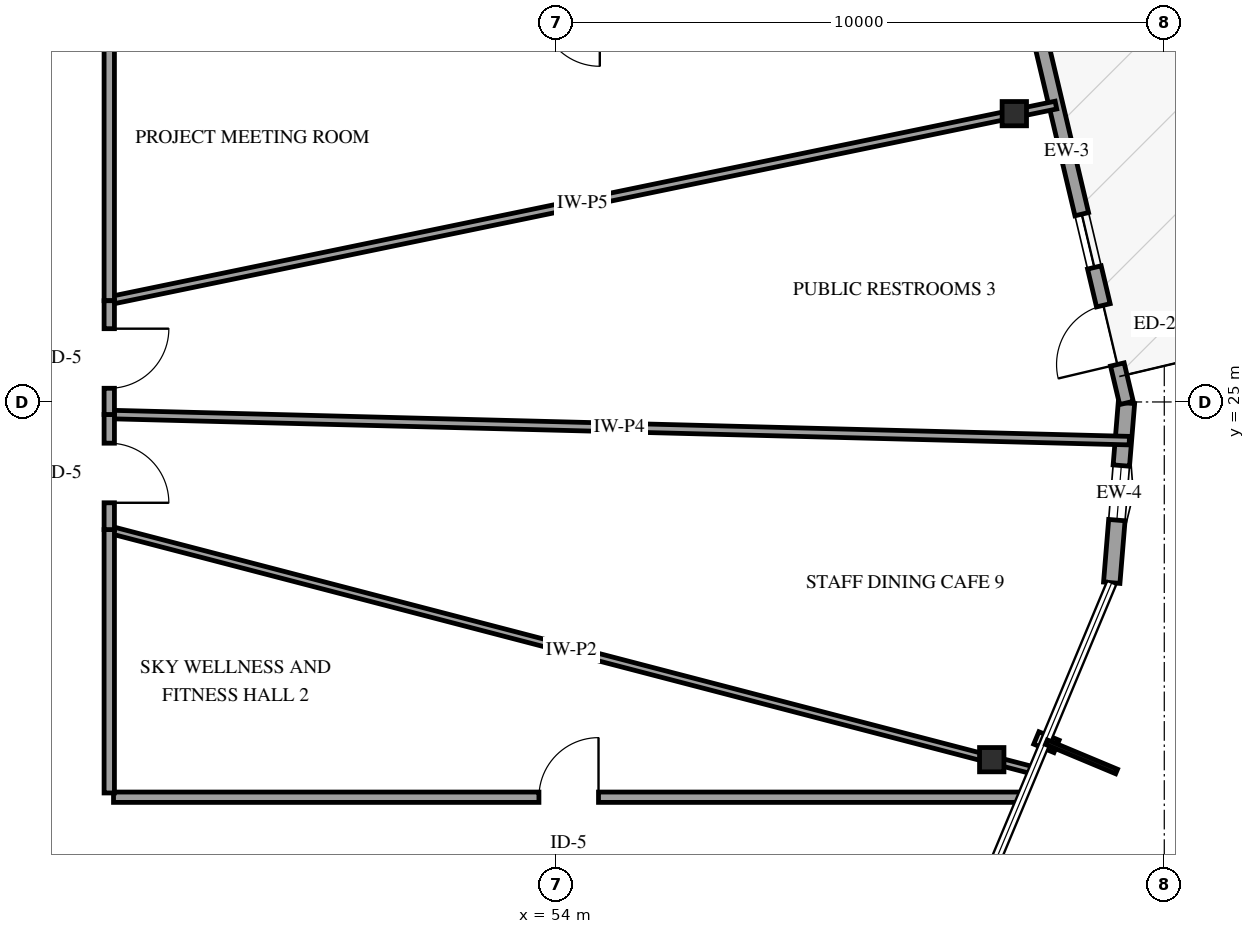
"""IFC4 building model, lengths in metres.
Left out: names, types, materials, properties, quantities, classifications, styles, units other than length and angle.
Written with IfcOpenShell. Run it as: python <this file> out.ifc"""

import sys

from ifc_helpers import new_model, si_unit, direction, frame, frame_2d, origin, origin_2d, place, context, subcontext, project, spatial, rectangle, i_section, extrude, element, fill, save


model = new_model("IFC4")
c1 = context("Model", 3, precision=1e-05, world=origin(), true_north=direction((0.0, 1.0)))
c2 = subcontext(c1, "Body", "Model", "MODEL_VIEW")
j1 = project(units=[si_unit("LENGTHUNIT", "METRE"), si_unit("PLANEANGLEUNIT", "RADIAN")], contexts=[c1])
p1 = place(None, origin())
s1 = spatial("IfcSite", under=j1, at=p1, CompositionType="ELEMENT")
p2 = place(p1, origin())
s2 = spatial("IfcBuilding", under=s1, at=p2, CompositionType="ELEMENT")
p3 = place(p2, frame((0.0, 0.0, 280.0)))
s3 = spatial("IfcBuildingStorey", under=s2, at=p3, CompositionType="ELEMENT", Elevation=280.0)
for number, where, z_axis, x_axis in (
    (1, (61.534, 29.741, 0.0), (0.0, 0.0, 1.0), (1.0, 0.0, 0.0)),
    (2, (61.163, 19.117, 0.0), (0.0, 0.0, 1.0), (1.0, 0.0, 0.0)),
):
    element("IfcColumn", number, at=place(p3, frame(where, z_axis=z_axis, x_axis=x_axis)), inside=s3, PredefinedType="COLUMN", context=c2, shape_type="SweptSolid", body=[
        extrude(i_section(OverallWidth=0.401, OverallDepth=0.399, WebThickness=0.025, FlangeThickness=0.04, FilletRadius=0.038, at=origin_2d()), origin(), (0.0, 0.0, 1.0), 3.75),
    ])
p4 = place(p3, frame((63.136, 22.027, 0.0), z_axis=(0.0, 0.0, 1.0), x_axis=(0.081553869603, 0.99666893518, 0.0)))
e3 = element("IfcWall", 3, at=p4, inside=s3, PredefinedType="SOLIDWALL", context=c2, shape_type="SweptSolid", body=[
    extrude(rectangle(XDim=2.967, YDim=0.27, at=frame_2d((1.483, 0.0))), origin(), (0.0, 0.0, 1.0), 2.789),
])
p5 = place(p4, frame((1.033, 0.0, 0.75)))
e4 = element("IfcOpeningElement", 4, at=p5, cuts=e3, PredefinedType="OPENING", context=c2, shape_type="SweptSolid", body=[
    extrude(rectangle(XDim=0.9, YDim=1.5, at=frame_2d((0.45, 0.75))), frame((0.0, 0.145, 0.0), z_axis=(0.0, -1.0, 0.0), x_axis=(1.0, 0.0, 0.0)), (0.0, 0.0, 1.0), 0.29),
])
p6 = place(p3, frame((63.378, 24.984, 0.0), z_axis=(0.0, 0.0, 1.0), x_axis=(-0.230391946718, 0.973097914337, 0.0)))
e5 = element("IfcWall", 5, at=p6, inside=s3, PredefinedType="SOLIDWALL", context=c2, shape_type="SweptSolid", body=[
    extrude(rectangle(XDim=8.5, YDim=0.23, at=frame_2d((4.25, 0.0))), origin(), (0.0, 0.0, 1.0), 2.789),
])
p7 = place(p6, frame((0.65, 0.0, 0.0)))
e6 = element("IfcOpeningElement", 6, at=p7, cuts=e5, PredefinedType="OPENING", context=c2, shape_type="SweptSolid", body=[
    extrude(rectangle(XDim=1.0, YDim=2.15, at=frame_2d((0.5, 1.075))), frame((0.0, 0.125, 0.0), z_axis=(0.0, -1.0, 0.0), x_axis=(1.0, 0.0, 0.0)), (0.0, 0.0, 1.0), 0.25),
])
p8 = place(p6, frame((2.29, 0.0, 0.72)))
e7 = element("IfcOpeningElement", 7, at=p8, cuts=e5, PredefinedType="OPENING", context=c2, shape_type="SweptSolid", body=[
    extrude(rectangle(XDim=0.9, YDim=1.5, at=frame_2d((0.45, 0.75))), frame((0.0, 0.125, 0.0), z_axis=(0.0, -1.0, 0.0), x_axis=(1.0, 0.0, 0.0)), (0.0, 0.0, 1.0), 0.25),
])
p9 = place(p3, frame((63.425, 24.364, 0.0), z_axis=(0.0, 0.0, 1.0), x_axis=(-0.999671736729, 0.025620671048, 0.0)))
e8 = element("IfcWall", 8, at=p9, inside=s3, PredefinedType="PARTITIONING", context=c2, shape_type="SweptSolid", body=[
    extrude(rectangle(XDim=16.781, YDim=0.14, at=frame_2d((8.39, 0.0))), origin(), (0.0, 0.0, 1.0), 3.41),
])
p10 = place(p3, frame((46.65, 26.665, 0.0), z_axis=(0.0, 0.0, 1.0), x_axis=(0.97930966803, 0.202367423521, 0.0)))
e9 = element("IfcWall", 9, at=p10, inside=s3, PredefinedType="PARTITIONING", context=c2, shape_type="SweptSolid", body=[
    extrude(rectangle(XDim=15.897, YDim=0.13, at=frame_2d((7.948, 0.0))), origin(), (0.0, 0.0, 1.0), 2.705),
])
p11 = place(p3, frame((46.65, 22.901, 0.0), z_axis=(0.0, 0.0, 1.0), x_axis=(0.967667772628, -0.252228233586, 0.0)))
e10 = element("IfcWall", 10, at=p11, inside=s3, PredefinedType="PARTITIONING", context=c2, shape_type="SweptSolid", body=[
    extrude(rectangle(XDim=15.704, YDim=0.12, at=frame_2d((7.852, 0.0))), origin(), (0.0, 0.0, 1.0), 3.41),
])
p12 = place(p3, frame((46.72, 18.5, 0.0), z_axis=(0.0, 0.0, 1.0), x_axis=(1.0, 0.0, 0.0)))
e11 = element("IfcWall", 11, at=p12, inside=s3, PredefinedType="PARTITIONING", context=c2, shape_type="SweptSolid", body=[
    extrude(rectangle(XDim=14.942, YDim=0.17, at=frame_2d((7.471, 0.0))), origin(), (0.0, 0.0, 1.0), 2.705),
])
p13 = place(p12, frame((6.996, 0.0, 0.0)))
e12 = element("IfcOpeningElement", 12, at=p13, cuts=e11, PredefinedType="OPENING", context=c2, shape_type="SweptSolid", body=[
    extrude(rectangle(XDim=0.98, YDim=2.15, at=frame_2d((0.49, 1.075))), frame((0.0, 0.095, 0.0), z_axis=(0.0, -1.0, 0.0), x_axis=(1.0, 0.0, 0.0)), (0.0, 0.0, 1.0), 0.19),
])
p14 = place(p3, frame((46.65, 31.5, 0.0), z_axis=(0.0, 0.0, 1.0), x_axis=(0.0, -1.0, 0.0)))
e13 = element("IfcWall", 13, at=p14, inside=s3, PredefinedType="PARTITIONING", context=c2, shape_type="SweptSolid", body=[
    extrude(rectangle(XDim=4.835, YDim=0.17, at=frame_2d((2.417, 0.0))), origin(), (0.0, 0.0, 1.0), 3.41),
])
p15 = place(p3, frame((46.65, 22.901, 0.0), z_axis=(0.0, 0.0, 1.0), x_axis=(0.0, -1.0, 0.0)))
e14 = element("IfcWall", 14, at=p15, inside=s3, PredefinedType="PARTITIONING", context=c2, shape_type="SweptSolid", body=[
    extrude(rectangle(XDim=4.331, YDim=0.17, at=frame_2d((2.166, 0.0))), origin(), (0.0, 0.0, 1.0), 3.41),
])
p16 = place(p3, frame((46.65, 24.794, 0.0), z_axis=(0.0, 0.0, 1.0), x_axis=(0.0, -1.0, 0.0)))
e15 = element("IfcWall", 15, at=p16, inside=s3, PredefinedType="PARTITIONING", context=c2, shape_type="SweptSolid", body=[
    extrude(rectangle(XDim=1.893, YDim=0.17, at=frame_2d((0.947, 0.0))), origin(), (0.0, 0.0, 1.0), 3.41),
])
p17 = place(p16, frame((0.472, 0.0, 0.0)))
e16 = element("IfcOpeningElement", 16, at=p17, cuts=e15, PredefinedType="OPENING", context=c2, shape_type="SweptSolid", body=[
    extrude(rectangle(XDim=0.98, YDim=2.15, at=frame_2d((0.49, 1.075))), frame((0.0, 0.095, 0.0), z_axis=(0.0, -1.0, 0.0), x_axis=(1.0, 0.0, 0.0)), (0.0, 0.0, 1.0), 0.19),
])
p18 = place(p3, frame((46.65, 26.665, 0.0), z_axis=(0.0, 0.0, 1.0), x_axis=(0.0, -1.0, 0.0)))
e17 = element("IfcWall", 17, at=p18, inside=s3, PredefinedType="PARTITIONING", context=c2, shape_type="SweptSolid", body=[
    extrude(rectangle(XDim=1.871, YDim=0.17, at=frame_2d((0.936, 0.0))), origin(), (0.0, 0.0, 1.0), 3.41),
])
p19 = place(p18, frame((0.46, 0.0, 0.0)))
e18 = element("IfcOpeningElement", 18, at=p19, cuts=e17, PredefinedType="OPENING", context=c2, shape_type="SweptSolid", body=[
    extrude(rectangle(XDim=0.98, YDim=2.15, at=frame_2d((0.49, 1.075))), frame((0.0, 0.095, 0.0), z_axis=(0.0, -1.0, 0.0), x_axis=(1.0, 0.0, 0.0)), (0.0, 0.0, 1.0), 0.19),
])
p20 = place(p5, origin())
e19 = element("IfcWindow", 19, at=p20, inside=s3, PartitioningType="SINGLE_PANEL", PredefinedType="WINDOW", context=c2, shape_type="SweptSolid", body=[
    extrude(rectangle(XDim=0.9, YDim=1.5, at=frame_2d((0.45, 0.75))), frame((0.0, 0.03, 0.0), z_axis=(0.0, -1.0, 0.0), x_axis=(1.0, 0.0, 0.0)), (0.0, 0.0, 1.0), 0.06),
])
fill(e4, e19)
p21 = place(p7, origin())
e20 = element("IfcDoor", 20, at=p21, inside=s3, OperationType="SINGLE_SWING_LEFT", PredefinedType="DOOR", context=c2, shape_type="SweptSolid", body=[
    extrude(rectangle(XDim=1.0, YDim=2.15, at=frame_2d((0.5, 1.075))), frame((0.0, 0.025, 0.0), z_axis=(0.0, -1.0, 0.0), x_axis=(1.0, 0.0, 0.0)), (0.0, 0.0, 1.0), 0.05),
])
fill(e6, e20)
p22 = place(p8, origin())
e21 = element("IfcWindow", 21, at=p22, inside=s3, PartitioningType="SINGLE_PANEL", PredefinedType="WINDOW", context=c2, shape_type="SweptSolid", body=[
    extrude(rectangle(XDim=0.9, YDim=1.5, at=frame_2d((0.45, 0.75))), frame((0.0, 0.03, 0.0), z_axis=(0.0, -1.0, 0.0), x_axis=(1.0, 0.0, 0.0)), (0.0, 0.0, 1.0), 0.06),
])
fill(e7, e21)
p23 = place(p13, origin())
e22 = element("IfcDoor", 22, at=p23, inside=s3, OperationType="SINGLE_SWING_RIGHT", PredefinedType="DOOR", context=c2, shape_type="SweptSolid", body=[
    extrude(rectangle(XDim=0.98, YDim=2.15, at=frame_2d((0.49, 1.075))), frame((0.0, 0.025, 0.0), z_axis=(0.0, -1.0, 0.0), x_axis=(1.0, 0.0, 0.0)), (0.0, 0.0, 1.0), 0.05),
])
fill(e12, e22)
p24 = place(p17, origin())
e23 = element("IfcDoor", 23, at=p24, inside=s3, OperationType="SINGLE_SWING_RIGHT", PredefinedType="DOOR", context=c2, shape_type="SweptSolid", body=[
    extrude(rectangle(XDim=0.98, YDim=2.15, at=frame_2d((0.49, 1.075))), frame((0.0, 0.025, 0.0), z_axis=(0.0, -1.0, 0.0), x_axis=(1.0, 0.0, 0.0)), (0.0, 0.0, 1.0), 0.05),
])
fill(e16, e23)
p25 = place(p19, origin())
e24 = element("IfcDoor", 24, at=p25, inside=s3, OperationType="SINGLE_SWING_LEFT", PredefinedType="DOOR", context=c2, shape_type="SweptSolid", body=[
    extrude(rectangle(XDim=0.98, YDim=2.15, at=frame_2d((0.49, 1.075))), frame((0.0, 0.025, 0.0), z_axis=(0.0, -1.0, 0.0), x_axis=(1.0, 0.0, 0.0)), (0.0, 0.0, 1.0), 0.05),
])
fill(e18, e24)
save(model, sys.argv[1])
